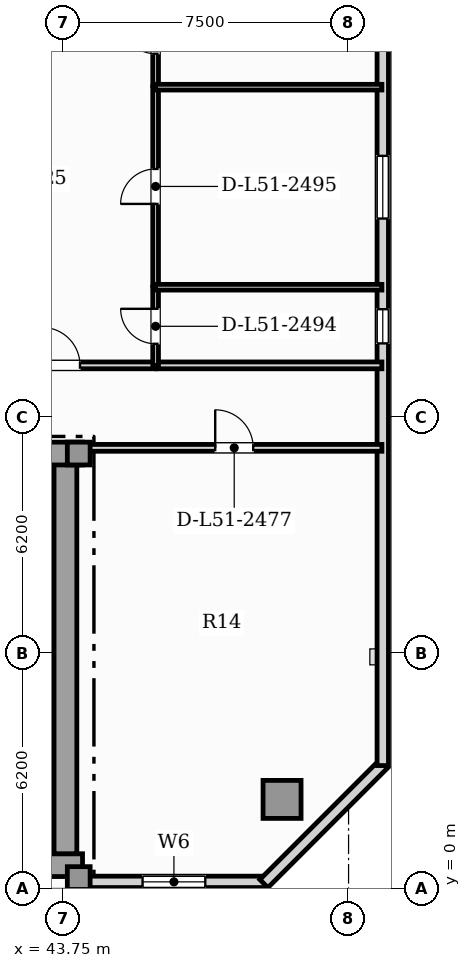
"""IFC4 building model, lengths in metres.
Left out: names, types, materials, properties, quantities, classifications, styles, units other than length and angle.
Written with IfcOpenShell. Run it as: python <this file> out.ifc"""

import sys

from ifc_helpers import new_model, si_unit, direction, frame, frame_2d, origin, origin_2d, place, context, subcontext, project, spatial, rectangle, hollow_rectangle, extrude, element, fill, save


model = new_model("IFC4")
c1 = context("Model", 3, precision=1e-05, world=origin(), true_north=direction((0.0, 1.0)))
c2 = subcontext(c1, "Body", "Model", "MODEL_VIEW")
j1 = project(units=[si_unit("LENGTHUNIT", "METRE"), si_unit("PLANEANGLEUNIT", "RADIAN")], contexts=[c1])
p1 = place(None, origin())
s1 = spatial("IfcSite", under=j1, at=p1, CompositionType="ELEMENT")
p2 = place(p1, origin())
s2 = spatial("IfcBuilding", under=s1, at=p2, CompositionType="ELEMENT")
p3 = place(p2, frame((0.0, 0.0, 208.0)))
s3 = spatial("IfcBuildingStorey", under=s2, at=p3, CompositionType="ELEMENT", Elevation=208.0)
p4 = place(p3, frame((13.25, 0.62, 0.0), z_axis=(0.0, 0.0, 1.0), x_axis=(1.0, 0.0, 0.0)))
e1 = element("IfcWall", 1, at=p4, inside=s3, PredefinedType="SHEAR", context=c2, shape_type="SweptSolid", body=[
    extrude(rectangle(XDim=31.0, YDim=0.6, at=frame_2d((15.5, 0.0))), origin(), (0.0, 0.0, 1.0), 3.63),
])
p5 = place(p3, frame((43.8, 0.92, 0.0), z_axis=(0.0, 0.0, 1.0), x_axis=(0.0, 1.0, 0.0)))
e2 = element("IfcWall", 2, at=p5, inside=s3, PredefinedType="SHEAR", context=c2, shape_type="SweptSolid", body=[
    extrude(rectangle(XDim=10.53, YDim=0.6, at=frame_2d((5.265, 0.0))), origin(), (0.0, 0.0, 1.0), 3.63),
])
p6 = place(p3, frame((41.3, 11.45, 0.0), z_axis=(0.0, 0.0, 1.0), x_axis=(1.0, 0.0, 0.0)))
e3 = element("IfcWall", 3, at=p6, inside=s3, PredefinedType="SHEAR", context=c2, shape_type="SweptSolid", body=[
    extrude(rectangle(XDim=2.95, YDim=0.6, at=frame_2d((1.475, 0.0))), origin(), (0.0, 0.0, 1.0), 3.63),
])
for number, where, z_axis, x_axis in (
    (4, (44.15, 0.28, 0.0), (0.0, 0.0, 1.0), (1.0, 0.0, 0.0)),
    (5, (44.15, 11.45, 0.0), (0.0, 0.0, 1.0), (1.0, 0.0, 0.0)),
):
    element("IfcColumn", number, at=place(p3, frame(where, z_axis=z_axis, x_axis=x_axis)), inside=s3, PredefinedType="COLUMN", context=c2, shape_type="SweptSolid", body=[
        extrude(rectangle(XDim=0.6, YDim=0.6, at=origin_2d()), origin(), (0.0, 0.0, 1.0), 3.85),
    ])
p7 = place(p3, frame((49.5, 2.35, 0.0), z_axis=(0.0, 0.0, 1.0), x_axis=(1.0, 0.0, 0.0)))
e6 = element("IfcColumn", 6, at=p7, inside=s3, PredefinedType="USERDEFINED", context=c2, shape_type="SweptSolid", body=[
    extrude(hollow_rectangle(XDim=1.0, YDim=1.0, WallThickness=0.06, at=origin_2d()), origin(), (0.0, 0.0, 1.0), 3.85),
])
p8 = place(p3, frame((44.25, 0.18, 0.0), z_axis=(0.0, 0.0, 1.0), x_axis=(1.0, 0.0, 0.0)))
e7 = element("IfcWall", 7, at=p8, inside=s3, PredefinedType="SOLIDWALL", context=c2, shape_type="SweptSolid", body=[
    extrude(rectangle(XDim=4.81, YDim=0.3, at=frame_2d((2.405, 0.0))), origin(), (0.0, 0.0, 1.0), 3.63),
])
p9 = place(p8, frame((1.58, 0.0, 0.88)))
e8 = element("IfcOpeningElement", 8, at=p9, cuts=e7, PredefinedType="OPENING", context=c2, shape_type="SweptSolid", body=[
    extrude(rectangle(XDim=1.65, YDim=2.0, at=frame_2d((0.825, 1.0))), frame((0.0, 0.16, 0.0), z_axis=(0.0, -1.0, 0.0), x_axis=(1.0, 0.0, 0.0)), (0.0, 0.0, 1.0), 0.32),
])
p10 = place(p3, frame((49.022, 0.135, 0.0), z_axis=(0.0, 0.0, 1.0), x_axis=(0.707106781187, 0.707106781187, 0.0)))
e9 = element("IfcWall", 9, at=p10, inside=s3, PredefinedType="SOLIDWALL", context=c2, shape_type="SweptSolid", body=[
    extrude(rectangle(XDim=4.445, YDim=0.3, at=frame_2d((2.223, 0.0))), origin(), (0.0, 0.0, 1.0), 3.63),
])
p11 = place(p3, frame((52.15, 3.24, 0.0), z_axis=(0.0, 0.0, 1.0), x_axis=(0.0, 1.0, 0.0)))
e10 = element("IfcWall", 10, at=p11, inside=s3, PredefinedType="SOLIDWALL", context=c2, shape_type="SweptSolid", body=[
    extrude(rectangle(XDim=33.92, YDim=0.3, at=frame_2d((16.96, 0.0))), origin(), (0.0, 0.0, 1.0), 3.63),
])
p12 = place(p11, frame((30.56, 0.0, 0.95)))
e11 = element("IfcOpeningElement", 11, at=p12, cuts=e10, PredefinedType="OPENING", context=c2, shape_type="SweptSolid", body=[
    extrude(rectangle(XDim=0.9, YDim=1.5, at=frame_2d((0.45, 0.75))), frame((0.0, 0.16, 0.0), z_axis=(0.0, -1.0, 0.0), x_axis=(1.0, 0.0, 0.0)), (0.0, 0.0, 1.0), 0.32),
])
p13 = place(p11, frame((11.108, 0.0, 0.95)))
e12 = element("IfcOpeningElement", 12, at=p13, cuts=e10, PredefinedType="OPENING", context=c2, shape_type="SweptSolid", body=[
    extrude(rectangle(XDim=0.9, YDim=1.5, at=frame_2d((0.45, 0.75))), frame((0.0, 0.16, 0.0), z_axis=(0.0, -1.0, 0.0), x_axis=(1.0, 0.0, 0.0)), (0.0, 0.0, 1.0), 0.32),
])
p14 = place(p11, frame((14.393, 0.0, 0.88)))
e13 = element("IfcOpeningElement", 13, at=p14, cuts=e10, PredefinedType="OPENING", context=c2, shape_type="SweptSolid", body=[
    extrude(rectangle(XDim=1.65, YDim=2.0, at=frame_2d((0.825, 1.0))), frame((0.0, 0.16, 0.0), z_axis=(0.0, -1.0, 0.0), x_axis=(1.0, 0.0, 0.0)), (0.0, 0.0, 1.0), 0.32),
])
p15 = place(p11, frame((19.657, 0.0, 0.88)))
e14 = element("IfcOpeningElement", 14, at=p15, cuts=e10, PredefinedType="OPENING", context=c2, shape_type="SweptSolid", body=[
    extrude(rectangle(XDim=1.65, YDim=2.0, at=frame_2d((0.825, 1.0))), frame((0.0, 0.16, 0.0), z_axis=(0.0, -1.0, 0.0), x_axis=(1.0, 0.0, 0.0)), (0.0, 0.0, 1.0), 0.32),
])
p16 = place(p11, frame((25.862, 0.0, 0.88)))
e15 = element("IfcOpeningElement", 15, at=p16, cuts=e10, PredefinedType="OPENING", context=c2, shape_type="SweptSolid", body=[
    extrude(rectangle(XDim=1.65, YDim=2.0, at=frame_2d((0.825, 1.0))), frame((0.0, 0.16, 0.0), z_axis=(0.0, -1.0, 0.0), x_axis=(1.0, 0.0, 0.0)), (0.0, 0.0, 1.0), 0.32),
])
p17 = place(p11, frame((32.24, 0.0, 0.95)))
e16 = element("IfcOpeningElement", 16, at=p17, cuts=e10, PredefinedType="OPENING", context=c2, shape_type="SweptSolid", body=[
    extrude(rectangle(XDim=0.9, YDim=1.5, at=frame_2d((0.45, 0.75))), frame((0.0, 0.16, 0.0), z_axis=(0.0, -1.0, 0.0), x_axis=(1.0, 0.0, 0.0)), (0.0, 0.0, 1.0), 0.32),
])
p18 = place(p3, frame((40.06, 8.52, 0.0), z_axis=(0.0, 0.0, 1.0), x_axis=(1.0, 0.0, 0.0)))
e17 = element("IfcWall", 17, at=p18, inside=s3, PredefinedType="SOLIDWALL", context=c2, shape_type="SweptSolid", body=[
    extrude(rectangle(XDim=3.4, YDim=0.22, at=frame_2d((1.7, 0.0))), origin(), (0.0, 0.0, 1.0), 3.63),
])
p19 = place(p18, frame((1.125, 0.0, 0.0)))
e18 = element("IfcOpeningElement", 18, at=p19, cuts=e17, PredefinedType="OPENING", context=c2, shape_type="SweptSolid", body=[
    extrude(rectangle(XDim=1.15, YDim=2.2, at=frame_2d((0.575, 1.1))), frame((0.0, 0.12, 0.0), z_axis=(0.0, -1.0, 0.0), x_axis=(1.0, 0.0, 0.0)), (0.0, 0.0, 1.0), 0.24),
])
p20 = place(p3, frame((44.355, 11.6, 0.0), z_axis=(0.0, 0.0, 1.0), x_axis=(1.0, 0.0, 0.0)))
e19 = element("IfcWall", 19, at=p20, inside=s3, PredefinedType="PARTITIONING", context=c2, shape_type="SweptSolid", body=[
    extrude(rectangle(XDim=7.772, YDim=0.18, at=frame_2d((3.886, 0.0))), origin(), (0.0, 0.0, 1.0), 3.63),
])
p21 = place(p20, frame((3.386, 0.0, 0.0)))
e20 = element("IfcOpeningElement", 20, at=p21, cuts=e19, PredefinedType="OPENING", context=c2, shape_type="SweptSolid", body=[
    extrude(rectangle(XDim=1.0, YDim=2.15, at=frame_2d((0.5, 1.075))), frame((0.0, 0.1, 0.0), z_axis=(0.0, -1.0, 0.0), x_axis=(1.0, 0.0, 0.0)), (0.0, 0.0, 1.0), 0.2),
])
p22 = place(p3, frame((41.188, 13.77, 0.0), z_axis=(0.0, 0.0, 1.0), x_axis=(1.0, 0.0, 0.0)))
e21 = element("IfcWall", 21, at=p22, inside=s3, PredefinedType="PARTITIONING", context=c2, shape_type="SweptSolid", body=[
    extrude(rectangle(XDim=4.99, YDim=0.18, at=frame_2d((2.495, 0.0))), origin(), (0.0, 0.0, 1.0), 3.63),
])
p23 = place(p22, frame((1.995, 0.0, 0.0)))
e22 = element("IfcOpeningElement", 22, at=p23, cuts=e21, PredefinedType="OPENING", context=c2, shape_type="SweptSolid", body=[
    extrude(rectangle(XDim=1.0, YDim=2.15, at=frame_2d((0.5, 1.075))), frame((0.0, 0.1, 0.0), z_axis=(0.0, -1.0, 0.0), x_axis=(1.0, 0.0, 0.0)), (0.0, 0.0, 1.0), 0.2),
])
p24 = place(p3, frame((46.208, 13.77, 0.0), z_axis=(0.0, 0.0, 1.0), x_axis=(1.0, 0.0, 0.0)))
e23 = element("IfcWall", 23, at=p24, inside=s3, PredefinedType="PARTITIONING", context=c2, shape_type="SweptSolid", body=[
    extrude(rectangle(XDim=5.919, YDim=0.18, at=frame_2d((2.96, 0.0))), origin(), (0.0, 0.0, 1.0), 3.63),
])
p25 = place(p3, frame((46.173, 13.765, 0.0), z_axis=(0.0, 0.0, 1.0), x_axis=(0.0, 1.0, 0.0)))
e24 = element("IfcWall", 24, at=p25, inside=s3, PredefinedType="PARTITIONING", context=c2, shape_type="SweptSolid", body=[
    extrude(rectangle(XDim=2.066, YDim=0.15, at=frame_2d((1.033, 0.0))), origin(), (0.0, 0.0, 1.0), 3.63),
])
p26 = place(p25, frame((0.573, 0.0, 0.0)))
e25 = element("IfcOpeningElement", 25, at=p26, cuts=e24, PredefinedType="OPENING", context=c2, shape_type="SweptSolid", body=[
    extrude(rectangle(XDim=0.92, YDim=2.1, at=frame_2d((0.46, 1.05))), frame((0.0, 0.085, 0.0), z_axis=(0.0, -1.0, 0.0), x_axis=(1.0, 0.0, 0.0)), (0.0, 0.0, 1.0), 0.17),
])
p27 = place(p3, frame((46.173, 15.861, 0.0), z_axis=(0.0, 0.0, 1.0), x_axis=(0.0, 1.0, 0.0)))
e26 = element("IfcWall", 26, at=p27, inside=s3, PredefinedType="PARTITIONING", context=c2, shape_type="SweptSolid", body=[
    extrude(rectangle(XDim=5.234, YDim=0.15, at=frame_2d((2.617, 0.0))), origin(), (0.0, 0.0, 1.0), 3.63),
])
p28 = place(p27, frame((2.157, 0.0, 0.0)))
e27 = element("IfcOpeningElement", 27, at=p28, cuts=e26, PredefinedType="OPENING", context=c2, shape_type="SweptSolid", body=[
    extrude(rectangle(XDim=0.92, YDim=2.1, at=frame_2d((0.46, 1.05))), frame((0.0, 0.085, 0.0), z_axis=(0.0, -1.0, 0.0), x_axis=(1.0, 0.0, 0.0)), (0.0, 0.0, 1.0), 0.17),
])
p29 = place(p3, frame((46.173, 21.125, 0.0), z_axis=(0.0, 0.0, 1.0), x_axis=(0.0, 1.0, 0.0)))
e28 = element("IfcWall", 28, at=p29, inside=s3, PredefinedType="PARTITIONING", context=c2, shape_type="SweptSolid", body=[
    extrude(rectangle(XDim=2.609, YDim=0.15, at=frame_2d((1.305, 0.0))), origin(), (0.0, 0.0, 1.0), 3.63),
])
p30 = place(p29, frame((0.845, 0.0, 0.0)))
e29 = element("IfcOpeningElement", 29, at=p30, cuts=e28, PredefinedType="OPENING", context=c2, shape_type="SweptSolid", body=[
    extrude(rectangle(XDim=0.92, YDim=2.1, at=frame_2d((0.46, 1.05))), frame((0.0, 0.085, 0.0), z_axis=(0.0, -1.0, 0.0), x_axis=(1.0, 0.0, 0.0)), (0.0, 0.0, 1.0), 0.17),
])
for number, where, z_axis, x_axis in (
    (30, (46.168, 15.826, 0.0), (0.0, 0.0, 1.0), (1.0, 0.0, 0.0)),
    (31, (46.168, 21.09, 0.0), (0.0, 0.0, 1.0), (1.0, 0.0, 0.0)),
):
    element("IfcWall", number, at=place(p3, frame(where, z_axis=z_axis, x_axis=x_axis)), inside=s3, PredefinedType="PARTITIONING", context=c2, shape_type="SweptSolid", body=[
        extrude(rectangle(XDim=5.959, YDim=0.15, at=frame_2d((2.979, 0.0))), origin(), (0.0, 0.0, 1.0), 3.63),
    ])
p31 = place(p9, origin())
e32 = element("IfcWindow", 32, at=p31, inside=s3, PartitioningType="SINGLE_PANEL", PredefinedType="WINDOW", context=c2, shape_type="SweptSolid", body=[
    extrude(rectangle(XDim=1.65, YDim=2.0, at=frame_2d((0.825, 1.0))), frame((0.0, 0.03, 0.0), z_axis=(0.0, -1.0, 0.0), x_axis=(1.0, 0.0, 0.0)), (0.0, 0.0, 1.0), 0.06),
])
fill(e8, e32)
p32 = place(p13, origin())
e33 = element("IfcWindow", 33, at=p32, inside=s3, PartitioningType="SINGLE_PANEL", PredefinedType="WINDOW", context=c2, shape_type="SweptSolid", body=[
    extrude(rectangle(XDim=0.9, YDim=1.5, at=frame_2d((0.45, 0.75))), frame((0.0, 0.03, 0.0), z_axis=(0.0, -1.0, 0.0), x_axis=(1.0, 0.0, 0.0)), (0.0, 0.0, 1.0), 0.06),
])
fill(e12, e33)
p33 = place(p14, origin())
e34 = element("IfcWindow", 34, at=p33, inside=s3, PartitioningType="SINGLE_PANEL", PredefinedType="WINDOW", context=c2, shape_type="SweptSolid", body=[
    extrude(rectangle(XDim=1.65, YDim=2.0, at=frame_2d((0.825, 1.0))), frame((0.0, 0.03, 0.0), z_axis=(0.0, -1.0, 0.0), x_axis=(1.0, 0.0, 0.0)), (0.0, 0.0, 1.0), 0.06),
])
fill(e13, e34)
p34 = place(p21, origin())
e35 = element("IfcDoor", 35, at=p34, inside=s3, OperationType="SINGLE_SWING_LEFT", PredefinedType="DOOR", context=c2, shape_type="SweptSolid", body=[
    extrude(rectangle(XDim=1.0, YDim=2.15, at=frame_2d((0.5, 1.075))), frame((0.0, 0.025, 0.0), z_axis=(0.0, -1.0, 0.0), x_axis=(1.0, 0.0, 0.0)), (0.0, 0.0, 1.0), 0.05),
])
fill(e20, e35)
p35 = place(p23, origin())
e36 = element("IfcDoor", 36, at=p35, inside=s3, OperationType="SINGLE_SWING_LEFT", PredefinedType="DOOR", context=c2, shape_type="SweptSolid", body=[
    extrude(rectangle(XDim=1.0, YDim=2.15, at=frame_2d((0.5, 1.075))), frame((0.0, 0.025, 0.0), z_axis=(0.0, -1.0, 0.0), x_axis=(1.0, 0.0, 0.0)), (0.0, 0.0, 1.0), 0.05),
])
fill(e22, e36)
p36 = place(p26, origin())
e37 = element("IfcDoor", 37, at=p36, inside=s3, OperationType="SINGLE_SWING_RIGHT", PredefinedType="DOOR", context=c2, shape_type="SweptSolid", body=[
    extrude(rectangle(XDim=0.92, YDim=2.1, at=frame_2d((0.46, 1.05))), frame((0.0, 0.025, 0.0), z_axis=(0.0, -1.0, 0.0), x_axis=(1.0, 0.0, 0.0)), (0.0, 0.0, 1.0), 0.05),
])
fill(e25, e37)
p37 = place(p28, origin())
e38 = element("IfcDoor", 38, at=p37, inside=s3, OperationType="SINGLE_SWING_LEFT", PredefinedType="DOOR", context=c2, shape_type="SweptSolid", body=[
    extrude(rectangle(XDim=0.92, YDim=2.1, at=frame_2d((0.46, 1.05))), frame((0.0, 0.025, 0.0), z_axis=(0.0, -1.0, 0.0), x_axis=(1.0, 0.0, 0.0)), (0.0, 0.0, 1.0), 0.05),
])
fill(e27, e38)
p38 = place(p30, origin())
e39 = element("IfcDoor", 39, at=p38, inside=s3, OperationType="SINGLE_SWING_RIGHT", PredefinedType="DOOR", context=c2, shape_type="SweptSolid", body=[
    extrude(rectangle(XDim=0.92, YDim=2.1, at=frame_2d((0.46, 1.05))), frame((0.0, 0.025, 0.0), z_axis=(0.0, -1.0, 0.0), x_axis=(1.0, 0.0, 0.0)), (0.0, 0.0, 1.0), 0.05),
])
fill(e29, e39)
save(model, sys.argv[1])
